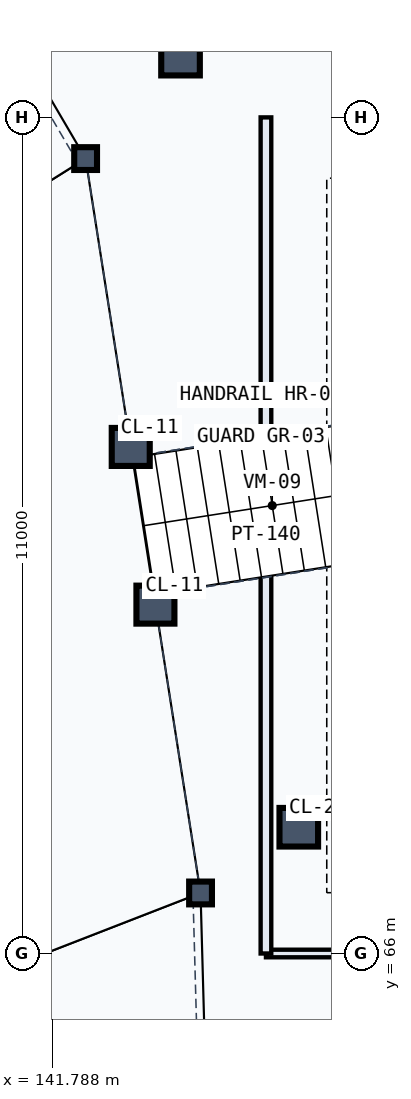
"""IFC4 building model, lengths in metres.
Left out: names, types, materials, properties, quantities, classifications, styles, units other than length and angle.
Written with IfcOpenShell. Run it as: python <this file> out.ifc"""

import sys

from ifc_helpers import new_model, si_unit, direction, frame, frame_2d, origin, origin_2d, place, context, subcontext, project, spatial, rectangle, hollow_rectangle, hollow_circle, extrude, element, save


model = new_model("IFC4")
c1 = context("Model", 3, precision=1e-05, world=origin(), true_north=direction((0.0, 1.0)))
c2 = subcontext(c1, "Body", "Model", "MODEL_VIEW")
j1 = project(units=[si_unit("LENGTHUNIT", "METRE"), si_unit("PLANEANGLEUNIT", "RADIAN")], contexts=[c1])
p1 = place(None, origin())
s1 = spatial("IfcSite", under=j1, at=p1, CompositionType="ELEMENT")
p2 = place(p1, origin())
s2 = spatial("IfcBuilding", under=s1, at=p2, CompositionType="ELEMENT")
p3 = place(p2, frame((0.0, 0.0, 14.7)))
s3 = spatial("IfcBuildingStorey", under=s2, at=p3, CompositionType="ELEMENT", Elevation=14.7)
for number, where, z_axis, x_axis in (
    (1, (145.032, 67.661, 0.0), (0.0, 0.0, 1.0), (1.0, 0.0, 0.0)),
    (2, (143.476, 77.806, 0.0), (0.0, 0.0, 1.0), (1.0, 0.0, 0.0)),
):
    element("IfcColumn", number, at=place(p3, frame(where, z_axis=z_axis, x_axis=x_axis)), inside=s3, PredefinedType="COLUMN", context=c2, shape_type="SweptSolid", body=[
        extrude(hollow_circle(Radius=0.254, WallThickness=0.02, at=origin_2d()), origin(), (0.0, 0.0, 1.0), 4.8),
    ])
p4 = place(p3, frame((143.74, 66.796, 0.0), z_axis=(0.0, 0.0, 1.0), x_axis=(1.0, 0.0, 0.0)))
e3 = element("IfcColumn", 3, at=p4, inside=s3, PredefinedType="COLUMN", context=c2, shape_type="SweptSolid", body=[
    extrude(hollow_rectangle(XDim=0.3, YDim=0.3, WallThickness=0.016, at=origin_2d()), origin(), (0.0, 0.0, 1.0), 1.22),
])
for number, where, z_axis, x_axis in (
    (4, (143.146, 70.59, 0.0), (0.0, 0.0, 1.0), (1.0, 0.0, 0.0)),
    (5, (142.821, 72.665, 0.0), (0.0, 0.0, 1.0), (1.0, 0.0, 0.0)),
):
    element("IfcColumn", number, at=place(p3, frame(where, z_axis=z_axis, x_axis=x_axis)), inside=s3, PredefinedType="COLUMN", context=c2, shape_type="SweptSolid", body=[
        extrude(rectangle(XDim=0.5, YDim=0.5, at=origin_2d()), origin(), (0.0, 0.0, 1.0), 1.7),
    ])
p5 = place(p3, frame((142.227, 76.458, 0.0), z_axis=(0.0, 0.0, 1.0), x_axis=(1.0, 0.0, 0.0)))
e6 = element("IfcColumn", 6, at=p5, inside=s3, PredefinedType="COLUMN", context=c2, shape_type="SweptSolid", body=[
    extrude(hollow_rectangle(XDim=0.3, YDim=0.3, WallThickness=0.016, at=origin_2d()), origin(), (0.0, 0.0, 1.0), 1.22),
])
p6 = place(p3, frame((144.6, 66.0, 0.0), z_axis=(0.0, 0.0, 1.0), x_axis=(1.0, 0.0, 0.0)))
e7 = element("IfcWall", 7, at=p6, inside=s3, PredefinedType="PARTITIONING", context=c2, shape_type="SweptSolid", body=[
    extrude(rectangle(XDim=3.517, YDim=0.1, at=frame_2d((1.758, 0.0))), origin(), (0.0, 0.0, 1.0), 3.69),
])
p7 = place(p6, frame((1.238, 0.0, 0.0)))
e8 = element("IfcOpeningElement", 8, at=p7, cuts=e7, PredefinedType="OPENING", context=c2, shape_type="SweptSolid", body=[
    extrude(rectangle(XDim=1.04, YDim=2.15, at=frame_2d((0.52, 1.075))), frame((0.0, 0.06, 0.0), z_axis=(0.0, -1.0, 0.0), x_axis=(1.0, 0.0, 0.0)), (0.0, 0.0, 1.0), 0.12),
])
p8 = place(p3, frame((144.6, 66.0, 0.0), z_axis=(0.0, 0.0, 1.0), x_axis=(0.0, 1.0, 0.0)))
e9 = element("IfcWall", 9, at=p8, inside=s3, PredefinedType="PARTITIONING", context=c2, shape_type="SweptSolid", body=[
    extrude(rectangle(XDim=11.0, YDim=0.14, at=frame_2d((5.5, 0.0))), origin(), (0.0, 0.0, 1.0), 3.69),
])
save(model, sys.argv[1])
